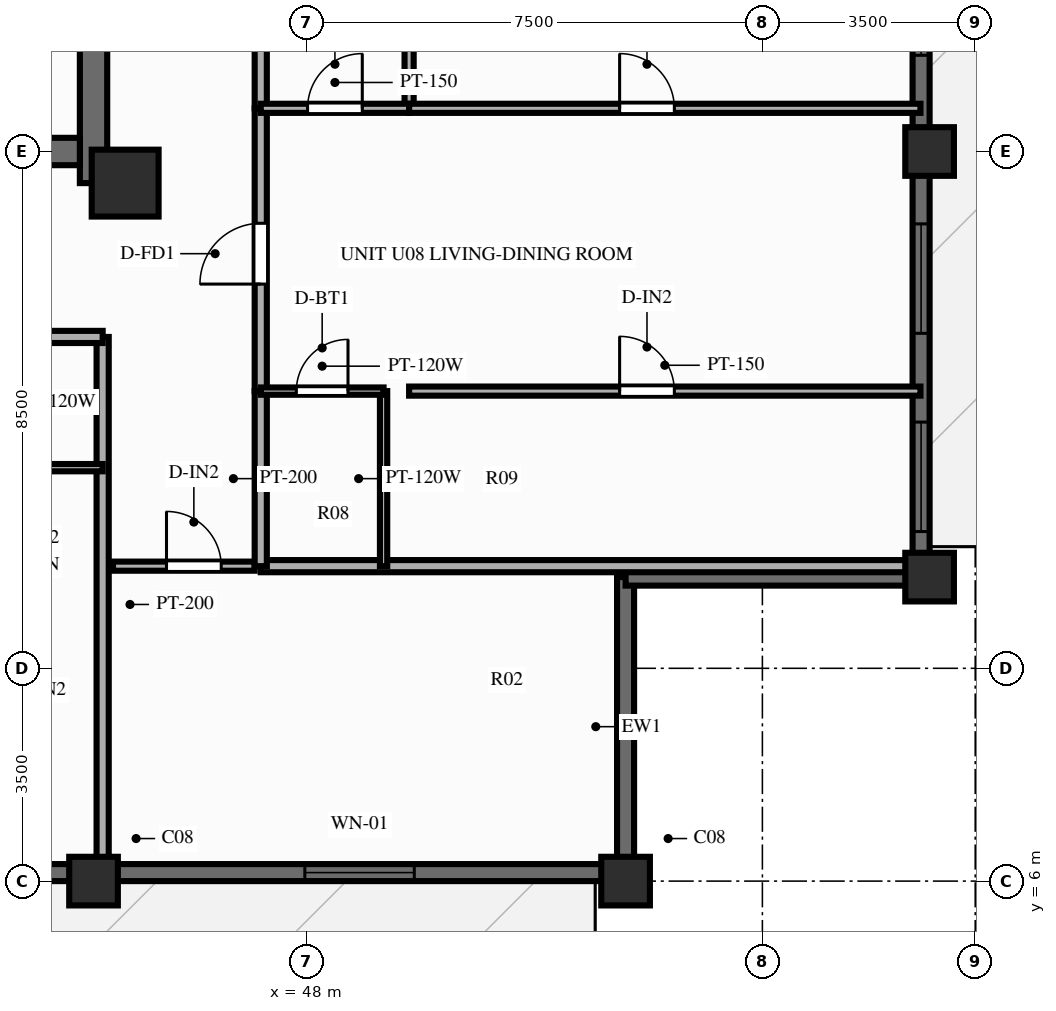
"""IFC4 building model, lengths in metres.
Left out: names, types, materials, properties, quantities, classifications, styles, units other than length and angle.
Written with IfcOpenShell. Run it as: python <this file> out.ifc"""

import sys

from ifc_helpers import new_model, si_unit, direction, frame, frame_2d, origin, origin_2d, place, context, subcontext, project, spatial, rectangle, extrude, source, transform, mapped, element, fill, save


model = new_model("IFC4")
c1 = context("Model", 3, precision=1e-05, world=origin(), true_north=direction((0.0, 1.0)))
c2 = subcontext(c1, "Body", "Model", "MODEL_VIEW")
j1 = project(units=[si_unit("LENGTHUNIT", "METRE"), si_unit("PLANEANGLEUNIT", "RADIAN")], contexts=[c1])
p1 = place(None, origin())
s1 = spatial("IfcSite", under=j1, at=p1, CompositionType="ELEMENT")
p2 = place(p1, origin())
s2 = spatial("IfcBuilding", under=s1, at=p2, CompositionType="ELEMENT")
p3 = place(p2, frame((0.0, 0.0, 182.8)))
s3 = spatial("IfcBuildingStorey", under=s2, at=p3, CompositionType="ELEMENT", Elevation=182.8)
p4 = place(p3, frame((44.5, 17.48, 0.0), z_axis=(0.0, 0.0, 1.0), x_axis=(0.0, 1.0, 0.0)))
e1 = element("IfcWall", 1, at=p4, inside=s3, PredefinedType="SHEAR", context=c2, shape_type="SweptSolid", body=[
    extrude(rectangle(XDim=19.04, YDim=0.45, at=frame_2d((9.52, 0.0))), origin(), (0.0, 0.0, 1.0), 3.9),
])
p5 = place(p4, frame((12.67, 0.0, 0.0), z_axis=(0.0, 0.0, 1.0), x_axis=(-1.0, 0.0, 0.0)))
e2 = element("IfcOpeningElement", 2, at=p5, cuts=e1, PredefinedType="OPENING", context=c2, shape_type="SweptSolid", body=[
    extrude(rectangle(XDim=1.1, YDim=2.15, at=frame_2d((0.55, 1.075))), frame((0.0, 0.237, 0.0), z_axis=(0.0, -1.0, 0.0), x_axis=(1.0, 0.0, 0.0)), (0.0, 0.0, 1.0), 0.474),
])
p6 = place(p3, frame((31.725, 18.0, 0.0), z_axis=(0.0, 0.0, 1.0), x_axis=(1.0, 0.0, 0.0)))
e3 = element("IfcWall", 3, at=p6, inside=s3, PredefinedType="SHEAR", context=c2, shape_type="SweptSolid", body=[
    extrude(rectangle(XDim=12.55, YDim=0.45, at=frame_2d((6.275, 0.0))), origin(), (0.0, 0.0, 1.0), 3.9),
])
m1 = source(origin(), c2, "Body", "SweptSolid", [
    extrude(rectangle(XDim=1.1, YDim=1.1, at=origin_2d()), origin(), (0.0, 0.0, 1.0), 3.9),
])
p7 = place(p3, frame((45.02, 17.48, 0.0), z_axis=(0.0, 0.0, 1.0), x_axis=(1.0, 0.0, 0.0)))
e4 = element("IfcColumn", 4, at=p7, inside=s3, PredefinedType="COLUMN", context=c2, shape_type="MappedRepresentation", body=[
    mapped(m1, transform((0.0, 0.0, 0.0), scale=1.0)),
])
m2 = source(origin(), c2, "Body", "SweptSolid", [
    extrude(rectangle(XDim=0.8, YDim=0.8, at=origin_2d()), origin(), (0.0, 0.0, 1.0), 3.9),
])
for number, where, z_axis, x_axis in (
    (5, (44.5, 6.0, 0.0), (0.0, 0.0, 1.0), (1.0, 0.0, 0.0)),
    (6, (53.25, 6.0, 0.0), (0.0, 0.0, 1.0), (1.0, 0.0, 0.0)),
    (7, (58.25, 11.0, 0.0), (0.0, 0.0, 1.0), (1.0, 0.0, 0.0)),
    (8, (58.25, 18.0, 0.0), (0.0, 0.0, 1.0), (1.0, 0.0, 0.0)),
):
    element("IfcColumn", number, at=place(p3, frame(where, z_axis=z_axis, x_axis=x_axis)), inside=s3, PredefinedType="COLUMN", context=c2, shape_type="MappedRepresentation", body=[
        mapped(m2, transform((0.0, 0.0, 0.0), scale=1.0)),
    ])
p8 = place(p3, frame((22.75, 6.14, 0.0), z_axis=(0.0, 0.0, 1.0), x_axis=(1.0, 0.0, 0.0)))
e9 = element("IfcWall", 9, at=p8, inside=s3, PredefinedType="SOLIDWALL", context=c2, shape_type="SweptSolid", body=[
    extrude(rectangle(XDim=30.5, YDim=0.28, at=frame_2d((15.25, 0.0))), origin(), (0.0, 0.0, 1.0), 2.79),
])
p9 = place(p8, frame((4.925, 0.0, 0.0), z_axis=(0.0, 0.0, 1.0), x_axis=(-1.0, 0.0, 0.0)))
e10 = element("IfcOpeningElement", 10, at=p9, cuts=e9, PredefinedType="OPENING", context=c2, shape_type="SweptSolid", body=[
    extrude(rectangle(XDim=1.1, YDim=2.15, at=frame_2d((0.55, 1.075))), frame((0.0, 0.152, 0.0), z_axis=(0.0, -1.0, 0.0), x_axis=(1.0, 0.0, 0.0)), (0.0, 0.0, 1.0), 0.304),
])
p10 = place(p8, frame((9.42, 0.0, 0.85)))
e11 = element("IfcOpeningElement", 11, at=p10, cuts=e9, PredefinedType="OPENING", context=c2, shape_type="SweptSolid", body=[
    extrude(rectangle(XDim=0.95, YDim=1.5, at=frame_2d((0.475, 0.75))), frame((0.0, 0.152, 0.0), z_axis=(0.0, -1.0, 0.0), x_axis=(1.0, 0.0, 0.0)), (0.0, 0.0, 1.0), 0.304),
])
p11 = place(p8, frame((11.244, 0.0, 0.85)))
e12 = element("IfcOpeningElement", 12, at=p11, cuts=e9, PredefinedType="OPENING", context=c2, shape_type="SweptSolid", body=[
    extrude(rectangle(XDim=1.2, YDim=1.5, at=frame_2d((0.6, 0.75))), frame((0.0, 0.152, 0.0), z_axis=(0.0, -1.0, 0.0), x_axis=(1.0, 0.0, 0.0)), (0.0, 0.0, 1.0), 0.304),
])
p12 = place(p8, frame((13.452, 0.0, 0.85)))
e13 = element("IfcOpeningElement", 13, at=p12, cuts=e9, PredefinedType="OPENING", context=c2, shape_type="SweptSolid", body=[
    extrude(rectangle(XDim=1.5, YDim=1.65, at=frame_2d((0.75, 0.825))), frame((0.0, 0.152, 0.0), z_axis=(0.0, -1.0, 0.0), x_axis=(1.0, 0.0, 0.0)), (0.0, 0.0, 1.0), 0.304),
])
p13 = place(p8, frame((16.383, 0.0, 0.85)))
e14 = element("IfcOpeningElement", 14, at=p13, cuts=e9, PredefinedType="OPENING", context=c2, shape_type="SweptSolid", body=[
    extrude(rectangle(XDim=1.8, YDim=1.65, at=frame_2d((0.9, 0.825))), frame((0.0, 0.152, 0.0), z_axis=(0.0, -1.0, 0.0), x_axis=(1.0, 0.0, 0.0)), (0.0, 0.0, 1.0), 0.304),
])
p14 = place(p8, frame((19.53, 0.0, 0.85)))
e15 = element("IfcOpeningElement", 15, at=p14, cuts=e9, PredefinedType="OPENING", context=c2, shape_type="SweptSolid", body=[
    extrude(rectangle(XDim=1.5, YDim=1.65, at=frame_2d((0.75, 0.825))), frame((0.0, 0.152, 0.0), z_axis=(0.0, -1.0, 0.0), x_axis=(1.0, 0.0, 0.0)), (0.0, 0.0, 1.0), 0.304),
])
p15 = place(p8, frame((25.225, 0.0, 0.85)))
e16 = element("IfcOpeningElement", 16, at=p15, cuts=e9, PredefinedType="OPENING", context=c2, shape_type="SweptSolid", body=[
    extrude(rectangle(XDim=1.8, YDim=1.65, at=frame_2d((0.9, 0.825))), frame((0.0, 0.152, 0.0), z_axis=(0.0, -1.0, 0.0), x_axis=(1.0, 0.0, 0.0)), (0.0, 0.0, 1.0), 0.304),
])
p16 = place(p3, frame((58.11, 11.0, 0.0), z_axis=(0.0, 0.0, 1.0), x_axis=(0.0, 1.0, 0.0)))
e17 = element("IfcWall", 17, at=p16, inside=s3, PredefinedType="SOLIDWALL", context=c2, shape_type="SweptSolid", body=[
    extrude(rectangle(XDim=32.0, YDim=0.28, at=frame_2d((16.0, 0.0))), origin(), (0.0, 0.0, 1.0), 2.79),
])
p17 = place(p16, frame((0.75, 0.0, 0.85)))
e18 = element("IfcOpeningElement", 18, at=p17, cuts=e17, PredefinedType="OPENING", context=c2, shape_type="SweptSolid", body=[
    extrude(rectangle(XDim=1.8, YDim=1.65, at=frame_2d((0.9, 0.825))), frame((0.0, 0.152, 0.0), z_axis=(0.0, -1.0, 0.0), x_axis=(1.0, 0.0, 0.0)), (0.0, 0.0, 1.0), 0.304),
])
p18 = place(p16, frame((4.01, 0.0, 0.85)))
e19 = element("IfcOpeningElement", 19, at=p18, cuts=e17, PredefinedType="OPENING", context=c2, shape_type="SweptSolid", body=[
    extrude(rectangle(XDim=1.8, YDim=1.65, at=frame_2d((0.9, 0.825))), frame((0.0, 0.152, 0.0), z_axis=(0.0, -1.0, 0.0), x_axis=(1.0, 0.0, 0.0)), (0.0, 0.0, 1.0), 0.304),
])
p19 = place(p16, frame((8.582, 0.0, 0.85)))
e20 = element("IfcOpeningElement", 20, at=p19, cuts=e17, PredefinedType="OPENING", context=c2, shape_type="SweptSolid", body=[
    extrude(rectangle(XDim=1.8, YDim=1.65, at=frame_2d((0.9, 0.825))), frame((0.0, 0.152, 0.0), z_axis=(0.0, -1.0, 0.0), x_axis=(1.0, 0.0, 0.0)), (0.0, 0.0, 1.0), 0.304),
])
p20 = place(p16, frame((11.729, 0.0, 0.85)))
e21 = element("IfcOpeningElement", 21, at=p20, cuts=e17, PredefinedType="OPENING", context=c2, shape_type="SweptSolid", body=[
    extrude(rectangle(XDim=1.8, YDim=1.65, at=frame_2d((0.9, 0.825))), frame((0.0, 0.152, 0.0), z_axis=(0.0, -1.0, 0.0), x_axis=(1.0, 0.0, 0.0)), (0.0, 0.0, 1.0), 0.304),
])
p21 = place(p16, frame((16.718, 0.0, 0.0), z_axis=(0.0, 0.0, 1.0), x_axis=(-1.0, 0.0, 0.0)))
e22 = element("IfcOpeningElement", 22, at=p21, cuts=e17, PredefinedType="OPENING", context=c2, shape_type="SweptSolid", body=[
    extrude(rectangle(XDim=1.6, YDim=2.15, at=frame_2d((0.8, 1.075))), frame((0.0, 0.152, 0.0), z_axis=(0.0, -1.0, 0.0), x_axis=(1.0, 0.0, 0.0)), (0.0, 0.0, 1.0), 0.304),
])
p22 = place(p16, frame((18.863, 0.0, 0.85)))
e23 = element("IfcOpeningElement", 23, at=p22, cuts=e17, PredefinedType="OPENING", context=c2, shape_type="SweptSolid", body=[
    extrude(rectangle(XDim=1.8, YDim=1.65, at=frame_2d((0.9, 0.825))), frame((0.0, 0.152, 0.0), z_axis=(0.0, -1.0, 0.0), x_axis=(1.0, 0.0, 0.0)), (0.0, 0.0, 1.0), 0.304),
])
p23 = place(p16, frame((22.17, 0.0, 0.85)))
e24 = element("IfcOpeningElement", 24, at=p23, cuts=e17, PredefinedType="OPENING", context=c2, shape_type="SweptSolid", body=[
    extrude(rectangle(XDim=1.8, YDim=1.65, at=frame_2d((0.9, 0.825))), frame((0.0, 0.152, 0.0), z_axis=(0.0, -1.0, 0.0), x_axis=(1.0, 0.0, 0.0)), (0.0, 0.0, 1.0), 0.304),
])
p24 = place(p16, frame((25.706, 0.0, 0.85)))
e25 = element("IfcOpeningElement", 25, at=p24, cuts=e17, PredefinedType="OPENING", context=c2, shape_type="SweptSolid", body=[
    extrude(rectangle(XDim=1.8, YDim=1.65, at=frame_2d((0.9, 0.825))), frame((0.0, 0.152, 0.0), z_axis=(0.0, -1.0, 0.0), x_axis=(1.0, 0.0, 0.0)), (0.0, 0.0, 1.0), 0.304),
])
p25 = place(p16, frame((28.966, 0.0, 0.85)))
e26 = element("IfcOpeningElement", 26, at=p25, cuts=e17, PredefinedType="OPENING", context=c2, shape_type="SweptSolid", body=[
    extrude(rectangle(XDim=1.8, YDim=1.65, at=frame_2d((0.9, 0.825))), frame((0.0, 0.152, 0.0), z_axis=(0.0, -1.0, 0.0), x_axis=(1.0, 0.0, 0.0)), (0.0, 0.0, 1.0), 0.304),
])
for number, where, z_axis, x_axis in (
    (27, (53.25, 6.08, 0.0), (0.0, 0.0, 1.0), (0.0, 1.0, 0.0)),
    (28, (53.25, 11.0, 0.0), (0.0, 0.0, 1.0), (1.0, 0.0, 0.0)),
):
    element("IfcWall", number, at=place(p3, frame(where, z_axis=z_axis, x_axis=x_axis)), inside=s3, PredefinedType="SOLIDWALL", context=c2, shape_type="SweptSolid", body=[
        extrude(rectangle(XDim=4.92, YDim=0.28, at=frame_2d((2.46, 0.0))), origin(), (0.0, 0.0, 1.0), 2.79),
    ])
p26 = place(p3, frame((44.82, 11.18, 0.0), z_axis=(0.0, 0.0, 1.0), x_axis=(1.0, 0.0, 0.0)))
e29 = element("IfcWall", 29, at=p26, inside=s3, PredefinedType="PARTITIONING", context=c2, shape_type="SweptSolid", body=[
    extrude(rectangle(XDim=2.33, YDim=0.15, at=frame_2d((1.165, 0.0))), origin(), (0.0, 0.0, 1.0), 3.69),
])
p27 = place(p26, frame((0.88, 0.0, 0.0)))
e30 = element("IfcOpeningElement", 30, at=p27, cuts=e29, PredefinedType="OPENING", context=c2, shape_type="SweptSolid", body=[
    extrude(rectangle(XDim=0.9, YDim=2.1, at=frame_2d((0.45, 1.05))), frame((0.0, 0.087, 0.0), z_axis=(0.0, -1.0, 0.0), x_axis=(1.0, 0.0, 0.0)), (0.0, 0.0, 1.0), 0.174),
])
p28 = place(p3, frame((44.65, 14.95, 0.0), z_axis=(0.0, 0.0, 1.0), x_axis=(0.0, -1.0, 0.0)))
e31 = element("IfcWall", 31, at=p28, inside=s3, PredefinedType="PARTITIONING", context=c2, shape_type="SweptSolid", body=[
    extrude(rectangle(XDim=8.8, YDim=0.2, at=frame_2d((4.4, 0.0))), origin(), (0.0, 0.0, 1.0), 2.79),
])
p29 = place(p3, frame((41.8, 14.95, 0.0), z_axis=(0.0, 0.0, 1.0), x_axis=(1.0, 0.0, 0.0)))
e32 = element("IfcWall", 32, at=p29, inside=s3, PredefinedType="PARTITIONING", context=c2, shape_type="SweptSolid", body=[
    extrude(rectangle(XDim=2.85, YDim=0.2, at=frame_2d((1.425, 0.0))), origin(), (0.0, 0.0, 1.0), 3.69),
])
p30 = place(p3, frame((41.8, 12.8, 0.0), z_axis=(0.0, 0.0, 1.0), x_axis=(1.0, 0.0, 0.0)))
e33 = element("IfcWall", 33, at=p30, inside=s3, PredefinedType="PARTITIONING", context=c2, shape_type="SweptSolid", body=[
    extrude(rectangle(XDim=2.85, YDim=0.12, at=frame_2d((1.425, 0.0))), origin(), (0.0, 0.0, 1.0), 3.69),
])
p31 = place(p3, frame((47.25, 11.18, 0.0), z_axis=(0.0, 0.0, 1.0), x_axis=(1.0, 0.0, 0.0)))
e34 = element("IfcWall", 34, at=p31, inside=s3, PredefinedType="PARTITIONING", context=c2, shape_type="SweptSolid", body=[
    extrude(rectangle(XDim=10.85, YDim=0.2, at=frame_2d((5.425, 0.0))), origin(), (0.0, 0.0, 1.0), 3.69),
])
p32 = place(p3, frame((47.25, 11.18, 0.0), z_axis=(0.0, 0.0, 1.0), x_axis=(0.0, 1.0, 0.0)))
e35 = element("IfcWall", 35, at=p32, inside=s3, PredefinedType="PARTITIONING", context=c2, shape_type="SweptSolid", body=[
    extrude(rectangle(XDim=2.879, YDim=0.2, at=frame_2d((1.439, 0.0))), origin(), (0.0, 0.0, 1.0), 3.69),
])
p33 = place(p3, frame((47.25, 14.059, 0.0), z_axis=(0.0, 0.0, 1.0), x_axis=(0.0, 1.0, 0.0)))
e36 = element("IfcWall", 36, at=p33, inside=s3, PredefinedType="PARTITIONING", context=c2, shape_type="SweptSolid", body=[
    extrude(rectangle(XDim=4.651, YDim=0.2, at=frame_2d((2.326, 0.0))), origin(), (0.0, 0.0, 1.0), 3.69),
])
p34 = place(p33, frame((1.76, 0.0, 0.0)))
e37 = element("IfcOpeningElement", 37, at=p34, cuts=e36, PredefinedType="OPENING", context=c2, shape_type="SweptSolid", body=[
    extrude(rectangle(XDim=1.0, YDim=2.15, at=frame_2d((0.5, 1.075))), frame((0.0, 0.112, 0.0), z_axis=(0.0, -1.0, 0.0), x_axis=(1.0, 0.0, 0.0)), (0.0, 0.0, 1.0), 0.224),
])
p35 = place(p3, frame((47.25, 18.71, 0.0), z_axis=(0.0, 0.0, 1.0), x_axis=(0.0, 1.0, 0.0)))
e38 = element("IfcWall", 38, at=p35, inside=s3, PredefinedType="PARTITIONING", context=c2, shape_type="SweptSolid", body=[
    extrude(rectangle(XDim=3.544, YDim=0.2, at=frame_2d((1.772, 0.0))), origin(), (0.0, 0.0, 1.0), 3.69),
])
p36 = place(p3, frame((49.27, 11.18, 0.0), z_axis=(0.0, 0.0, 1.0), x_axis=(0.0, 1.0, 0.0)))
e39 = element("IfcWall", 39, at=p36, inside=s3, PredefinedType="PARTITIONING", context=c2, shape_type="SweptSolid", body=[
    extrude(rectangle(XDim=2.879, YDim=0.12, at=frame_2d((1.439, 0.0))), origin(), (0.0, 0.0, 1.0), 3.69),
])
p37 = place(p3, frame((49.69, 18.71, 0.0), z_axis=(0.0, 0.0, 1.0), x_axis=(0.0, 1.0, 0.0)))
e40 = element("IfcWall", 40, at=p37, inside=s3, PredefinedType="PARTITIONING", context=c2, shape_type="SweptSolid", body=[
    extrude(rectangle(XDim=3.544, YDim=0.15, at=frame_2d((1.772, 0.0))), origin(), (0.0, 0.0, 1.0), 3.69),
])
p38 = place(p3, frame((47.25, 14.059, 0.0), z_axis=(0.0, 0.0, 1.0), x_axis=(1.0, 0.0, 0.0)))
e41 = element("IfcWall", 41, at=p38, inside=s3, PredefinedType="PARTITIONING", context=c2, shape_type="SweptSolid", body=[
    extrude(rectangle(XDim=2.02, YDim=0.12, at=frame_2d((1.01, 0.0))), origin(), (0.0, 0.0, 1.0), 3.69),
])
p39 = place(p38, frame((0.585, 0.0, 0.0)))
e42 = element("IfcOpeningElement", 42, at=p39, cuts=e41, PredefinedType="OPENING", context=c2, shape_type="SweptSolid", body=[
    extrude(rectangle(XDim=0.85, YDim=2.05, at=frame_2d((0.425, 1.025))), frame((0.0, 0.072, 0.0), z_axis=(0.0, -1.0, 0.0), x_axis=(1.0, 0.0, 0.0)), (0.0, 0.0, 1.0), 0.144),
])
p40 = place(p3, frame((49.69, 14.059, 0.0), z_axis=(0.0, 0.0, 1.0), x_axis=(1.0, 0.0, 0.0)))
e43 = element("IfcWall", 43, at=p40, inside=s3, PredefinedType="PARTITIONING", context=c2, shape_type="SweptSolid", body=[
    extrude(rectangle(XDim=8.41, YDim=0.15, at=frame_2d((4.205, 0.0))), origin(), (0.0, 0.0, 1.0), 3.69),
])
p41 = place(p40, frame((3.462, 0.0, 0.0)))
e44 = element("IfcOpeningElement", 44, at=p41, cuts=e43, PredefinedType="OPENING", context=c2, shape_type="SweptSolid", body=[
    extrude(rectangle(XDim=0.9, YDim=2.1, at=frame_2d((0.45, 1.05))), frame((0.0, 0.087, 0.0), z_axis=(0.0, -1.0, 0.0), x_axis=(1.0, 0.0, 0.0)), (0.0, 0.0, 1.0), 0.174),
])
p42 = place(p3, frame((47.25, 18.71, 0.0), z_axis=(0.0, 0.0, 1.0), x_axis=(1.0, 0.0, 0.0)))
e45 = element("IfcWall", 45, at=p42, inside=s3, PredefinedType="PARTITIONING", context=c2, shape_type="SweptSolid", body=[
    extrude(rectangle(XDim=2.44, YDim=0.15, at=frame_2d((1.22, 0.0))), origin(), (0.0, 0.0, 1.0), 3.69),
])
p43 = place(p42, frame((0.77, 0.0, 0.0)))
e46 = element("IfcOpeningElement", 46, at=p43, cuts=e45, PredefinedType="OPENING", context=c2, shape_type="SweptSolid", body=[
    extrude(rectangle(XDim=0.9, YDim=2.1, at=frame_2d((0.45, 1.05))), frame((0.0, 0.087, 0.0), z_axis=(0.0, -1.0, 0.0), x_axis=(1.0, 0.0, 0.0)), (0.0, 0.0, 1.0), 0.174),
])
p44 = place(p3, frame((49.69, 18.71, 0.0), z_axis=(0.0, 0.0, 1.0), x_axis=(1.0, 0.0, 0.0)))
e47 = element("IfcWall", 47, at=p44, inside=s3, PredefinedType="PARTITIONING", context=c2, shape_type="SweptSolid", body=[
    extrude(rectangle(XDim=8.41, YDim=0.15, at=frame_2d((4.205, 0.0))), origin(), (0.0, 0.0, 1.0), 3.69),
])
p45 = place(p44, frame((3.462, 0.0, 0.0)))
e48 = element("IfcOpeningElement", 48, at=p45, cuts=e47, PredefinedType="OPENING", context=c2, shape_type="SweptSolid", body=[
    extrude(rectangle(XDim=0.9, YDim=2.1, at=frame_2d((0.45, 1.05))), frame((0.0, 0.087, 0.0), z_axis=(0.0, -1.0, 0.0), x_axis=(1.0, 0.0, 0.0)), (0.0, 0.0, 1.0), 0.174),
])
m3 = source(origin(), c2, "Body", "SweptSolid", [
    extrude(rectangle(XDim=1.8, YDim=1.65, at=frame_2d((0.9, 0.825))), frame((0.0, 0.03, 0.0), z_axis=(0.0, -1.0, 0.0), x_axis=(1.0, 0.0, 0.0)), (0.0, 0.0, 1.0), 0.06),
])
p46 = place(p15, origin())
e49 = element("IfcWindow", 49, at=p46, inside=s3, PartitioningType="SINGLE_PANEL", PredefinedType="WINDOW", context=c2, shape_type="MappedRepresentation", body=[
    mapped(m3, transform((0.0, 0.0, 0.0), scale=1.0)),
])
fill(e16, e49)
p47 = place(p17, origin())
e50 = element("IfcWindow", 50, at=p47, inside=s3, PartitioningType="SINGLE_PANEL", PredefinedType="WINDOW", context=c2, shape_type="MappedRepresentation", body=[
    mapped(m3, transform((0.0, 0.0, 0.0), scale=1.0)),
])
fill(e18, e50)
p48 = place(p18, origin())
e51 = element("IfcWindow", 51, at=p48, inside=s3, PartitioningType="SINGLE_PANEL", PredefinedType="WINDOW", context=c2, shape_type="MappedRepresentation", body=[
    mapped(m3, transform((0.0, 0.0, 0.0), scale=1.0)),
])
fill(e19, e51)
p49 = place(p19, origin())
e52 = element("IfcWindow", 52, at=p49, inside=s3, PartitioningType="SINGLE_PANEL", PredefinedType="WINDOW", context=c2, shape_type="MappedRepresentation", body=[
    mapped(m3, transform((0.0, 0.0, 0.0), scale=1.0)),
])
fill(e20, e52)
m4 = source(origin(), c2, "Body", "SweptSolid", [
    extrude(rectangle(XDim=0.9, YDim=2.1, at=frame_2d((0.45, 1.05))), frame((0.0, 0.025, 0.0), z_axis=(0.0, -1.0, 0.0), x_axis=(1.0, 0.0, 0.0)), (0.0, 0.0, 1.0), 0.05),
])
p50 = place(p27, origin())
e53 = element("IfcDoor", 53, at=p50, inside=s3, OperationType="SINGLE_SWING_LEFT", PredefinedType="DOOR", context=c2, shape_type="MappedRepresentation", body=[
    mapped(m4, transform((0.0, 0.0, 0.0), scale=1.0)),
])
fill(e30, e53)
m5 = source(origin(), c2, "Body", "SweptSolid", [
    extrude(rectangle(XDim=1.0, YDim=2.15, at=frame_2d((0.5, 1.075))), frame((0.0, 0.025, 0.0), z_axis=(0.0, -1.0, 0.0), x_axis=(1.0, 0.0, 0.0)), (0.0, 0.0, 1.0), 0.05),
])
p51 = place(p34, origin())
e54 = element("IfcDoor", 54, at=p51, inside=s3, OperationType="SINGLE_SWING_LEFT", PredefinedType="DOOR", context=c2, shape_type="MappedRepresentation", body=[
    mapped(m5, transform((0.0, 0.0, 0.0), scale=1.0)),
])
fill(e37, e54)
m6 = source(origin(), c2, "Body", "SweptSolid", [
    extrude(rectangle(XDim=0.85, YDim=2.05, at=frame_2d((0.425, 1.025))), frame((0.0, 0.025, 0.0), z_axis=(0.0, -1.0, 0.0), x_axis=(1.0, 0.0, 0.0)), (0.0, 0.0, 1.0), 0.05),
])
p52 = place(p39, origin())
e55 = element("IfcDoor", 55, at=p52, inside=s3, OperationType="SINGLE_SWING_RIGHT", PredefinedType="DOOR", context=c2, shape_type="MappedRepresentation", body=[
    mapped(m6, transform((0.0, 0.0, 0.0), scale=1.0)),
])
fill(e42, e55)
p53 = place(p41, origin())
e56 = element("IfcDoor", 56, at=p53, inside=s3, OperationType="SINGLE_SWING_LEFT", PredefinedType="DOOR", context=c2, shape_type="MappedRepresentation", body=[
    mapped(m4, transform((0.0, 0.0, 0.0), scale=1.0)),
])
fill(e44, e56)
p54 = place(p43, origin())
e57 = element("IfcDoor", 57, at=p54, inside=s3, OperationType="SINGLE_SWING_RIGHT", PredefinedType="DOOR", context=c2, shape_type="MappedRepresentation", body=[
    mapped(m4, transform((0.0, 0.0, 0.0), scale=1.0)),
])
fill(e46, e57)
p55 = place(p45, origin())
e58 = element("IfcDoor", 58, at=p55, inside=s3, OperationType="SINGLE_SWING_LEFT", PredefinedType="DOOR", context=c2, shape_type="MappedRepresentation", body=[
    mapped(m4, transform((0.0, 0.0, 0.0), scale=1.0)),
])
fill(e48, e58)
save(model, sys.argv[1])
